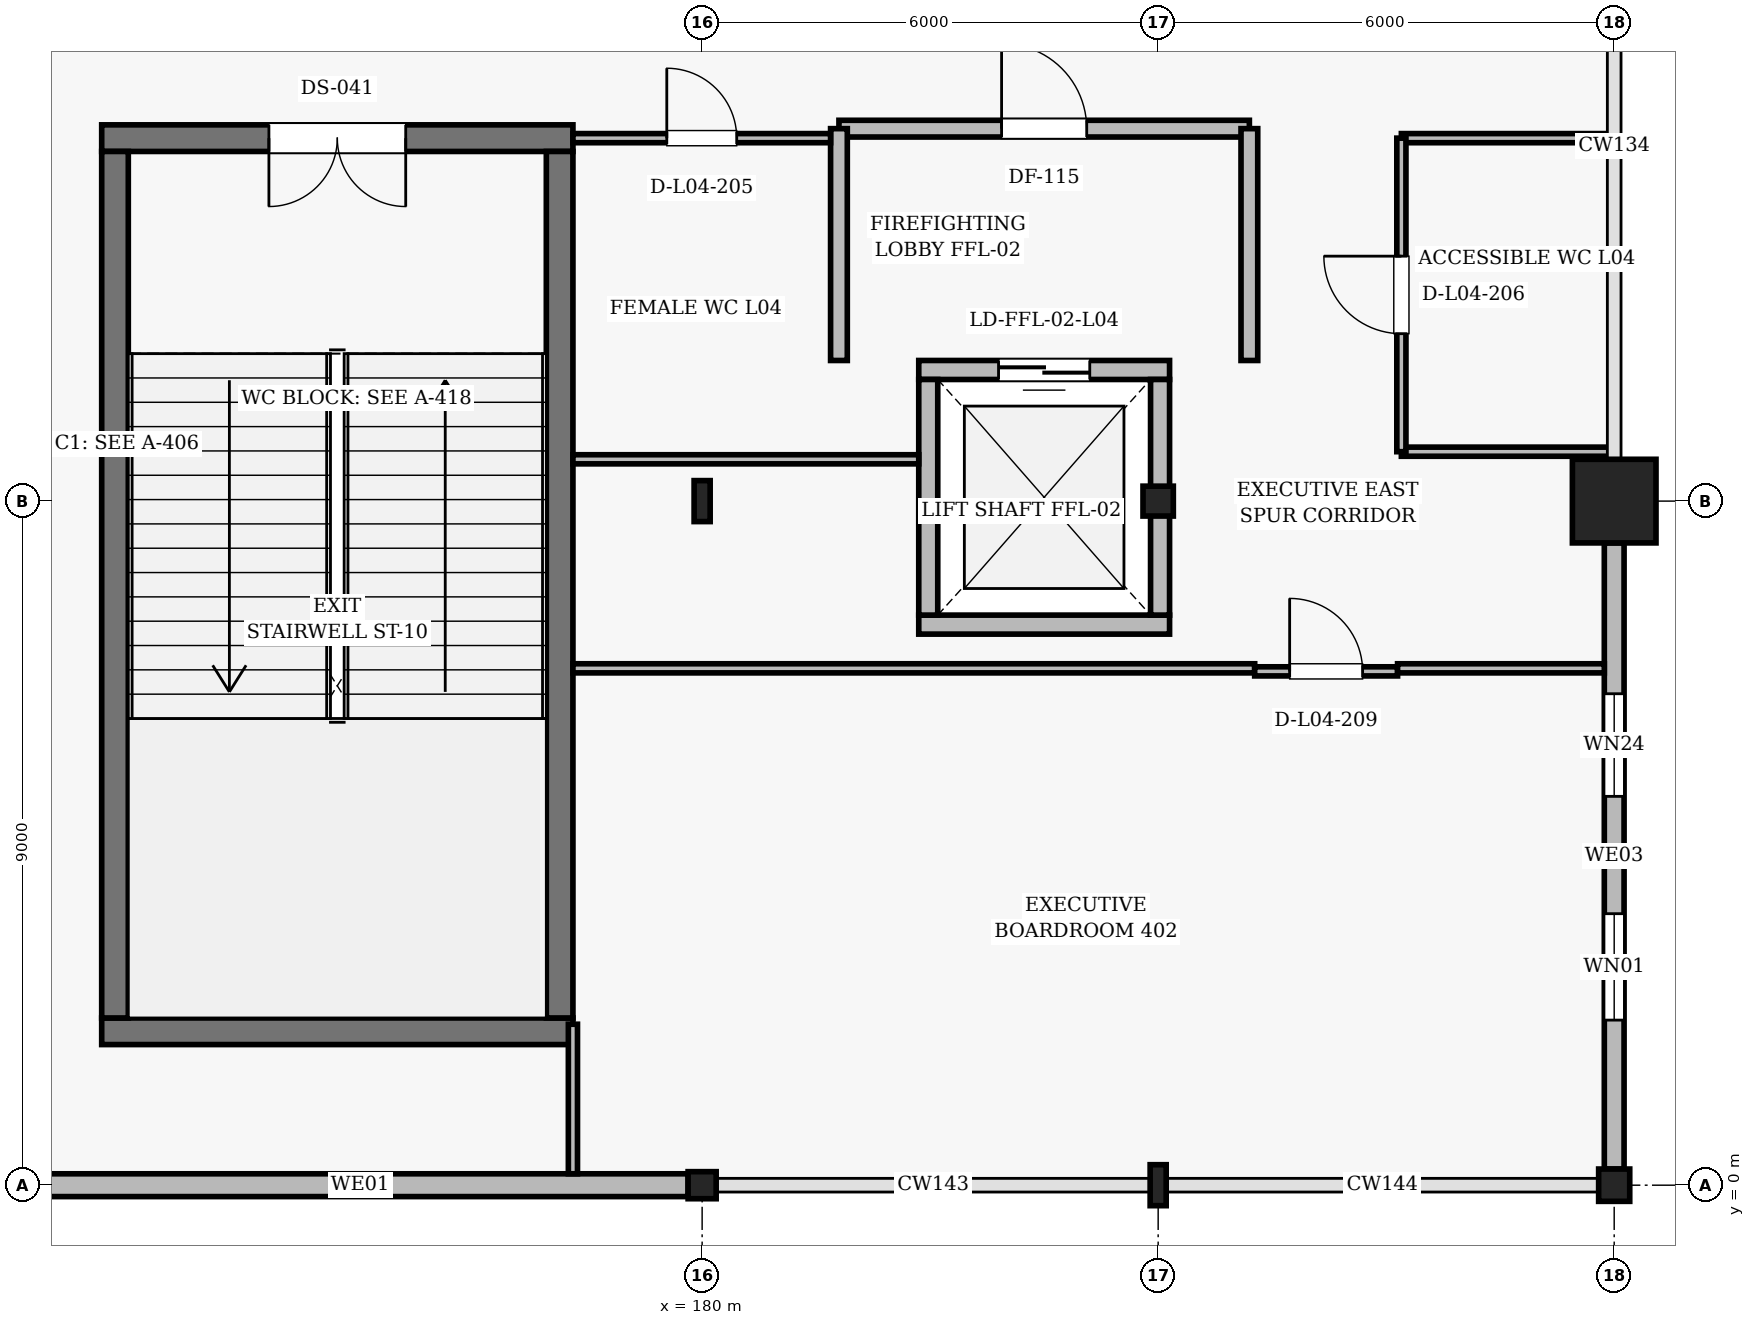
"""IFC4 building model, lengths in metres.
Left out: names, types, materials, properties, quantities, classifications, styles, units other than length and angle.
Written with IfcOpenShell. Run it as: python <this file> out.ifc"""

import sys

from ifc_helpers import new_model, si_unit, direction, frame, frame_2d, origin, origin_2d, place, context, subcontext, project, spatial, rectangle, i_section, extrude, element, fill, save


model = new_model("IFC4")
c1 = context("Model", 3, precision=1e-05, world=origin(), true_north=direction((0.0, 1.0)))
c2 = subcontext(c1, "Body", "Model", "MODEL_VIEW")
j1 = project(units=[si_unit("LENGTHUNIT", "METRE"), si_unit("PLANEANGLEUNIT", "RADIAN")], contexts=[c1])
p1 = place(None, origin())
s1 = spatial("IfcSite", under=j1, at=p1, CompositionType="ELEMENT")
p2 = place(p1, origin())
s2 = spatial("IfcBuilding", under=s1, at=p2, CompositionType="ELEMENT")
p3 = place(p2, frame((0.0, 0.0, 20.4)))
s3 = spatial("IfcBuildingStorey", under=s2, at=p3, CompositionType="ELEMENT", Elevation=20.4)
p4 = place(p3, frame((180.0, 0.0, 0.0), z_axis=(0.0, 0.0, 1.0), x_axis=(1.0, 0.0, 0.0)))
e1 = element("IfcColumn", 1, at=p4, inside=s3, PredefinedType="COLUMN", context=c2, shape_type="SweptSolid", body=[
    extrude(i_section(OverallWidth=0.369, OverallDepth=0.356, WebThickness=0.011, FlangeThickness=0.018, FilletRadius=0.015, at=origin_2d()), origin(), (0.0, 0.0, 1.0), 4.8),
])
for number, where, z_axis, x_axis in (
    (2, (180.0, 9.0, 0.0), (0.0, 0.0, 1.0), (1.0, 0.0, 0.0)),
    (3, (186.0, 0.0, 0.0), (0.0, 0.0, 1.0), (1.0, 0.0, 0.0)),
):
    element("IfcColumn", number, at=place(p3, frame(where, z_axis=z_axis, x_axis=x_axis)), inside=s3, PredefinedType="COLUMN", context=c2, shape_type="SweptSolid", body=[
        extrude(i_section(OverallWidth=0.211, OverallDepth=0.539, WebThickness=0.012, FlangeThickness=0.019, FilletRadius=0.014, at=origin_2d()), origin(), (0.0, 0.0, 1.0), 4.8),
    ])
p5 = place(p3, frame((186.0, 9.0, 0.0), z_axis=(0.0, 0.0, 1.0), x_axis=(1.0, 0.0, 0.0)))
e4 = element("IfcColumn", 4, at=p5, inside=s3, PredefinedType="COLUMN", context=c2, shape_type="SweptSolid", body=[
    extrude(i_section(OverallWidth=0.399, OverallDepth=0.393, WebThickness=0.023, FlangeThickness=0.037, FilletRadius=0.018, at=origin_2d()), origin(), (0.0, 0.0, 1.0), 4.8),
])
p6 = place(p3, frame((192.0, 0.0, 0.0), z_axis=(0.0, 0.0, 1.0), x_axis=(1.0, 0.0, 0.0)))
e5 = element("IfcColumn", 5, at=p6, inside=s3, PredefinedType="COLUMN", context=c2, shape_type="SweptSolid", body=[
    extrude(i_section(OverallWidth=0.409, OverallDepth=0.425, WebThickness=0.031, FlangeThickness=0.049, FilletRadius=0.02, at=origin_2d()), origin(), (0.0, 0.0, 1.0), 4.8),
])
p7 = place(p3, frame((192.0, 9.0, 0.0), z_axis=(0.0, 0.0, 1.0), x_axis=(1.0, 0.0, 0.0)))
e6 = element("IfcColumn", 6, at=p7, inside=s3, PredefinedType="COLUMN", context=c2, shape_type="SweptSolid", body=[
    extrude(rectangle(XDim=1.1, YDim=1.1, at=origin_2d()), origin(), (0.0, 0.0, 1.0), 4.8),
])
p8 = place(p3, frame((192.0, 8.45, 0.0), z_axis=(0.0, 0.0, 1.0), x_axis=(0.0, -1.0, 0.0)))
e7 = element("IfcWall", 7, at=p8, inside=s3, PredefinedType="SOLIDWALL", context=c2, shape_type="SweptSolid", body=[
    extrude(rectangle(XDim=8.238, YDim=0.26, at=frame_2d((4.119, 0.0))), origin(), (0.0, 0.0, 1.0), 4.245),
])
p9 = place(p8, frame((1.984, 0.0, 0.95)))
e8 = element("IfcOpeningElement", 8, at=p9, cuts=e7, PredefinedType="OPENING", context=c2, shape_type="SweptSolid", body=[
    extrude(rectangle(XDim=1.35, YDim=1.6, at=frame_2d((0.675, 0.8))), frame((0.0, 0.14, 0.0), z_axis=(0.0, -1.0, 0.0), x_axis=(1.0, 0.0, 0.0)), (0.0, 0.0, 1.0), 0.28),
])
p10 = place(p8, frame((4.878, 0.0, 0.95)))
e9 = element("IfcOpeningElement", 9, at=p10, cuts=e7, PredefinedType="OPENING", context=c2, shape_type="SweptSolid", body=[
    extrude(rectangle(XDim=1.4, YDim=1.7, at=frame_2d((0.7, 0.85))), frame((0.0, 0.14, 0.0), z_axis=(0.0, -1.0, 0.0), x_axis=(1.0, 0.0, 0.0)), (0.0, 0.0, 1.0), 0.28),
])
p11 = place(p3, frame((179.815, 0.0, 0.0), z_axis=(0.0, 0.0, 1.0), x_axis=(-1.0, 0.0, 0.0)))
e10 = element("IfcWall", 10, at=p11, inside=s3, PredefinedType="SOLIDWALL", context=c2, shape_type="SweptSolid", body=[
    extrude(rectangle(XDim=8.628, YDim=0.3, at=frame_2d((4.314, 0.0))), origin(), (0.0, 0.0, 1.0), 4.079),
])
p12 = place(p3, frame((172.1, 2.025, 0.0), z_axis=(0.0, 0.0, 1.0), x_axis=(1.0, 0.0, 0.0)))
e11 = element("IfcWall", 11, at=p12, inside=s3, PredefinedType="SHEAR", context=c2, shape_type="SweptSolid", body=[
    extrude(rectangle(XDim=6.2, YDim=0.35, at=frame_2d((3.1, 0.0))), origin(), (0.0, 0.0, 1.0), 4.56),
])
p13 = place(p3, frame((178.3, 13.775, 0.0), z_axis=(0.0, 0.0, 1.0), x_axis=(-1.0, 0.0, 0.0)))
e12 = element("IfcWall", 12, at=p13, inside=s3, PredefinedType="SHEAR", context=c2, shape_type="SweptSolid", body=[
    extrude(rectangle(XDim=6.2, YDim=0.35, at=frame_2d((3.1, 0.0))), origin(), (0.0, 0.0, 1.0), 4.56),
])
p14 = place(p13, frame((2.2, 0.0, 0.0)))
e13 = element("IfcOpeningElement", 13, at=p14, cuts=e12, PredefinedType="OPENING", context=c2, shape_type="SweptSolid", body=[
    extrude(rectangle(XDim=1.8, YDim=2.2, at=frame_2d((0.9, 1.1))), frame((0.0, 0.185, 0.0), z_axis=(0.0, -1.0, 0.0), x_axis=(1.0, 0.0, 0.0)), (0.0, 0.0, 1.0), 0.37),
])
for number, where, z_axis, x_axis in (
    (14, (172.275, 13.6, 0.0), (0.0, 0.0, 1.0), (0.0, -1.0, 0.0)),
    (15, (178.125, 2.2, 0.0), (0.0, 0.0, 1.0), (0.0, 1.0, 0.0)),
):
    element("IfcWall", number, at=place(p3, frame(where, z_axis=z_axis, x_axis=x_axis)), inside=s3, PredefinedType="SHEAR", context=c2, shape_type="SweptSolid", body=[
        extrude(rectangle(XDim=11.4, YDim=0.35, at=frame_2d((5.7, 0.0))), origin(), (0.0, 0.0, 1.0), 4.56),
    ])
p15 = place(p3, frame((182.85, 7.375, 0.0), z_axis=(0.0, 0.0, 1.0), x_axis=(1.0, 0.0, 0.0)))
e16 = element("IfcWall", 16, at=p15, inside=s3, PredefinedType="SOLIDWALL", context=c2, shape_type="SweptSolid", body=[
    extrude(rectangle(XDim=3.3, YDim=0.25, at=frame_2d((1.65, 0.0))), origin(), (0.0, 0.0, 1.0), 4.56),
])
p16 = place(p3, frame((186.15, 10.725, 0.0), z_axis=(0.0, 0.0, 1.0), x_axis=(-1.0, 0.0, 0.0)))
e17 = element("IfcWall", 17, at=p16, inside=s3, PredefinedType="SOLIDWALL", context=c2, shape_type="SweptSolid", body=[
    extrude(rectangle(XDim=3.3, YDim=0.25, at=frame_2d((1.65, 0.0))), origin(), (0.0, 0.0, 1.0), 4.56),
])
p17 = place(p16, frame((1.05, 0.0, 0.0)))
e18 = element("IfcOpeningElement", 18, at=p17, cuts=e17, PredefinedType="OPENING", context=c2, shape_type="SweptSolid", body=[
    extrude(rectangle(XDim=1.2, YDim=2.25, at=frame_2d((0.6, 1.125))), frame((0.0, 0.135, 0.0), z_axis=(0.0, -1.0, 0.0), x_axis=(1.0, 0.0, 0.0)), (0.0, 0.0, 1.0), 0.27),
])
for number, where, z_axis, x_axis in (
    (19, (182.975, 10.6, 0.0), (0.0, 0.0, 1.0), (0.0, -1.0, 0.0)),
    (20, (186.025, 7.5, 0.0), (0.0, 0.0, 1.0), (0.0, 1.0, 0.0)),
):
    element("IfcWall", number, at=place(p3, frame(where, z_axis=z_axis, x_axis=x_axis)), inside=s3, PredefinedType="SOLIDWALL", context=c2, shape_type="SweptSolid", body=[
        extrude(rectangle(XDim=3.1, YDim=0.25, at=frame_2d((1.55, 0.0))), origin(), (0.0, 0.0, 1.0), 4.56),
    ])
p18 = place(p3, frame((181.8, 13.9, 0.0), z_axis=(0.0, 0.0, 1.0), x_axis=(1.0, 0.0, 0.0)))
e21 = element("IfcWall", 21, at=p18, inside=s3, PredefinedType="SOLIDWALL", context=c2, shape_type="SweptSolid", body=[
    extrude(rectangle(XDim=5.4, YDim=0.22, at=frame_2d((2.7, 0.0))), origin(), (0.0, 0.0, 1.0), 4.56),
])
p19 = place(p18, frame((2.14, 0.0, 0.0)))
e22 = element("IfcOpeningElement", 22, at=p19, cuts=e21, PredefinedType="OPENING", context=c2, shape_type="SweptSolid", body=[
    extrude(rectangle(XDim=1.12, YDim=2.2, at=frame_2d((0.56, 1.1))), frame((0.0, 0.12, 0.0), z_axis=(0.0, -1.0, 0.0), x_axis=(1.0, 0.0, 0.0)), (0.0, 0.0, 1.0), 0.24),
])
for number, where, z_axis, x_axis in (
    (23, (181.8, 10.85, 0.0), (0.0, 0.0, 1.0), (0.0, 1.0, 0.0)),
    (24, (187.2, 10.85, 0.0), (0.0, 0.0, 1.0), (0.0, 1.0, 0.0)),
):
    element("IfcWall", number, at=place(p3, frame(where, z_axis=z_axis, x_axis=x_axis)), inside=s3, PredefinedType="SOLIDWALL", context=c2, shape_type="SweptSolid", body=[
        extrude(rectangle(XDim=3.05, YDim=0.22, at=frame_2d((1.525, 0.0))), origin(), (0.0, 0.0, 1.0), 4.56),
    ])
p20 = place(p3, frame((178.3, 13.775, 0.0), z_axis=(0.0, 0.0, 1.0), x_axis=(1.0, 0.0, 0.0)))
e25 = element("IfcWall", 25, at=p20, inside=s3, PredefinedType="PARTITIONING", context=c2, shape_type="SweptSolid", body=[
    extrude(rectangle(XDim=3.39, YDim=0.12, at=frame_2d((1.695, 0.0))), origin(), (0.0, 0.0, 1.0), 3.772),
])
p21 = place(p20, frame((1.235, 0.0, 0.0)))
e26 = element("IfcOpeningElement", 26, at=p21, cuts=e25, PredefinedType="OPENING", context=c2, shape_type="SweptSolid", body=[
    extrude(rectangle(XDim=0.92, YDim=2.12, at=frame_2d((0.46, 1.06))), frame((0.0, 0.07, 0.0), z_axis=(0.0, -1.0, 0.0), x_axis=(1.0, 0.0, 0.0)), (0.0, 0.0, 1.0), 0.14),
])
p22 = place(p3, frame((182.85, 9.55, 0.0), z_axis=(0.0, 0.0, 1.0), x_axis=(-1.0, 0.0, 0.0)))
e27 = element("IfcWall", 27, at=p22, inside=s3, PredefinedType="PARTITIONING", context=c2, shape_type="SweptSolid", body=[
    extrude(rectangle(XDim=4.55, YDim=0.12, at=frame_2d((2.275, 0.0))), origin(), (0.0, 0.0, 1.0), 3.772),
])
for number, where, z_axis, x_axis in (
    (28, (189.2, 13.775, 0.0), (0.0, 0.0, 1.0), (1.0, 0.0, 0.0)),
    (29, (191.988, 9.65, 0.0), (0.0, 0.0, 1.0), (-1.0, 0.0, 0.0)),
):
    element("IfcWall", number, at=place(p3, frame(where, z_axis=z_axis, x_axis=x_axis)), inside=s3, PredefinedType="PARTITIONING", context=c2, shape_type="SweptSolid", body=[
        extrude(rectangle(XDim=2.788, YDim=0.12, at=frame_2d((1.394, 0.0))), origin(), (0.0, 0.0, 1.0), 4.006),
    ])
p23 = place(p3, frame((189.2, 9.65, 0.0), z_axis=(0.0, 0.0, 1.0), x_axis=(0.0, 1.0, 0.0)))
e30 = element("IfcWall", 30, at=p23, inside=s3, PredefinedType="PARTITIONING", context=c2, shape_type="SweptSolid", body=[
    extrude(rectangle(XDim=4.125, YDim=0.12, at=frame_2d((2.062, 0.0))), origin(), (0.0, 0.0, 1.0), 4.56),
])
p24 = place(p23, frame((1.552, 0.0, 0.0)))
e31 = element("IfcOpeningElement", 31, at=p24, cuts=e30, PredefinedType="OPENING", context=c2, shape_type="SweptSolid", body=[
    extrude(rectangle(XDim=1.02, YDim=2.16, at=frame_2d((0.51, 1.08))), frame((0.0, 0.07, 0.0), z_axis=(0.0, -1.0, 0.0), x_axis=(1.0, 0.0, 0.0)), (0.0, 0.0, 1.0), 0.14),
])
p25 = place(p3, frame((178.3, 6.8, 0.0), z_axis=(0.0, 0.0, 1.0), x_axis=(1.0, 0.0, 0.0)))
e32 = element("IfcWall", 32, at=p25, inside=s3, PredefinedType="PARTITIONING", context=c2, shape_type="SweptSolid", body=[
    extrude(rectangle(XDim=8.97, YDim=0.12, at=frame_2d((4.485, 0.0))), origin(), (0.0, 0.0, 1.0), 3.934),
])
p26 = place(p3, frame((187.27, 6.76, 0.0), z_axis=(0.0, 0.0, 1.0), x_axis=(1.0, 0.0, 0.0)))
e33 = element("IfcWall", 33, at=p26, inside=s3, PredefinedType="PARTITIONING", context=c2, shape_type="SweptSolid", body=[
    extrude(rectangle(XDim=1.88, YDim=0.12, at=frame_2d((0.94, 0.0))), origin(), (0.0, 0.0, 1.0), 4.56),
])
p27 = place(p26, frame((0.46, 0.0, 0.0)))
e34 = element("IfcOpeningElement", 34, at=p27, cuts=e33, PredefinedType="OPENING", context=c2, shape_type="SweptSolid", body=[
    extrude(rectangle(XDim=0.96, YDim=2.15, at=frame_2d((0.48, 1.075))), frame((0.0, 0.07, 0.0), z_axis=(0.0, -1.0, 0.0), x_axis=(1.0, 0.0, 0.0)), (0.0, 0.0, 1.0), 0.14),
])
p28 = place(p3, frame((189.15, 6.8, 0.0), z_axis=(0.0, 0.0, 1.0), x_axis=(1.0, 0.0, 0.0)))
e35 = element("IfcWall", 35, at=p28, inside=s3, PredefinedType="PARTITIONING", context=c2, shape_type="SweptSolid", body=[
    extrude(rectangle(XDim=2.72, YDim=0.12, at=frame_2d((1.36, 0.0))), origin(), (0.0, 0.0, 1.0), 4.245),
])
p29 = place(p3, frame((178.3, 0.15, 0.0), z_axis=(0.0, 0.0, 1.0), x_axis=(0.0, 1.0, 0.0)))
e36 = element("IfcWall", 36, at=p29, inside=s3, PredefinedType="PARTITIONING", context=c2, shape_type="SweptSolid", body=[
    extrude(rectangle(XDim=1.968, YDim=0.12, at=frame_2d((0.984, 0.0))), origin(), (0.0, 0.0, 1.0), 4.079),
])
p30 = place(p9, origin())
e37 = element("IfcWindow", 37, at=p30, inside=s3, PartitioningType="SINGLE_PANEL", PredefinedType="WINDOW", context=c2, shape_type="SweptSolid", body=[
    extrude(rectangle(XDim=1.35, YDim=1.6, at=frame_2d((0.675, 0.8))), frame((0.0, 0.03, 0.0), z_axis=(0.0, -1.0, 0.0), x_axis=(1.0, 0.0, 0.0)), (0.0, 0.0, 1.0), 0.06),
])
fill(e8, e37)
p31 = place(p10, origin())
e38 = element("IfcWindow", 38, at=p31, inside=s3, PartitioningType="SINGLE_PANEL", PredefinedType="WINDOW", context=c2, shape_type="SweptSolid", body=[
    extrude(rectangle(XDim=1.4, YDim=1.7, at=frame_2d((0.7, 0.85))), frame((0.0, 0.03, 0.0), z_axis=(0.0, -1.0, 0.0), x_axis=(1.0, 0.0, 0.0)), (0.0, 0.0, 1.0), 0.06),
])
fill(e9, e38)
p32 = place(p14, origin())
e39 = element("IfcDoor", 39, at=p32, inside=s3, OperationType="DOUBLE_DOOR_SINGLE_SWING", PredefinedType="DOOR", context=c2, shape_type="SweptSolid", body=[
    extrude(rectangle(XDim=1.8, YDim=2.2, at=frame_2d((0.9, 1.1))), frame((0.0, 0.025, 0.0), z_axis=(0.0, -1.0, 0.0), x_axis=(1.0, 0.0, 0.0)), (0.0, 0.0, 1.0), 0.05),
])
fill(e13, e39)
p33 = place(p17, origin())
e40 = element("IfcDoor", 40, at=p33, inside=s3, OperationType="DOUBLE_DOOR_SLIDING", PredefinedType="DOOR", context=c2, shape_type="SweptSolid", body=[
    extrude(rectangle(XDim=1.2, YDim=2.25, at=frame_2d((0.6, 1.125))), frame((0.0, 0.025, 0.0), z_axis=(0.0, -1.0, 0.0), x_axis=(1.0, 0.0, 0.0)), (0.0, 0.0, 1.0), 0.05),
])
fill(e18, e40)
p34 = place(p19, origin())
e41 = element("IfcDoor", 41, at=p34, inside=s3, OperationType="SINGLE_SWING_LEFT", PredefinedType="DOOR", context=c2, shape_type="SweptSolid", body=[
    extrude(rectangle(XDim=1.12, YDim=2.2, at=frame_2d((0.56, 1.1))), frame((0.0, 0.025, 0.0), z_axis=(0.0, -1.0, 0.0), x_axis=(1.0, 0.0, 0.0)), (0.0, 0.0, 1.0), 0.05),
])
fill(e22, e41)
p35 = place(p21, origin())
e42 = element("IfcDoor", 42, at=p35, inside=s3, OperationType="SINGLE_SWING_LEFT", PredefinedType="DOOR", context=c2, shape_type="SweptSolid", body=[
    extrude(rectangle(XDim=0.92, YDim=2.12, at=frame_2d((0.46, 1.06))), frame((0.0, 0.025, 0.0), z_axis=(0.0, -1.0, 0.0), x_axis=(1.0, 0.0, 0.0)), (0.0, 0.0, 1.0), 0.05),
])
fill(e26, e42)
p36 = place(p24, origin())
e43 = element("IfcDoor", 43, at=p36, inside=s3, OperationType="SINGLE_SWING_RIGHT", PredefinedType="DOOR", context=c2, shape_type="SweptSolid", body=[
    extrude(rectangle(XDim=1.02, YDim=2.16, at=frame_2d((0.51, 1.08))), frame((0.0, 0.025, 0.0), z_axis=(0.0, -1.0, 0.0), x_axis=(1.0, 0.0, 0.0)), (0.0, 0.0, 1.0), 0.05),
])
fill(e31, e43)
p37 = place(p27, origin())
e44 = element("IfcDoor", 44, at=p37, inside=s3, OperationType="SINGLE_SWING_LEFT", PredefinedType="DOOR", context=c2, shape_type="SweptSolid", body=[
    extrude(rectangle(XDim=0.96, YDim=2.15, at=frame_2d((0.48, 1.075))), frame((0.0, 0.025, 0.0), z_axis=(0.0, -1.0, 0.0), x_axis=(1.0, 0.0, 0.0)), (0.0, 0.0, 1.0), 0.05),
])
fill(e34, e44)
save(model, sys.argv[1])
